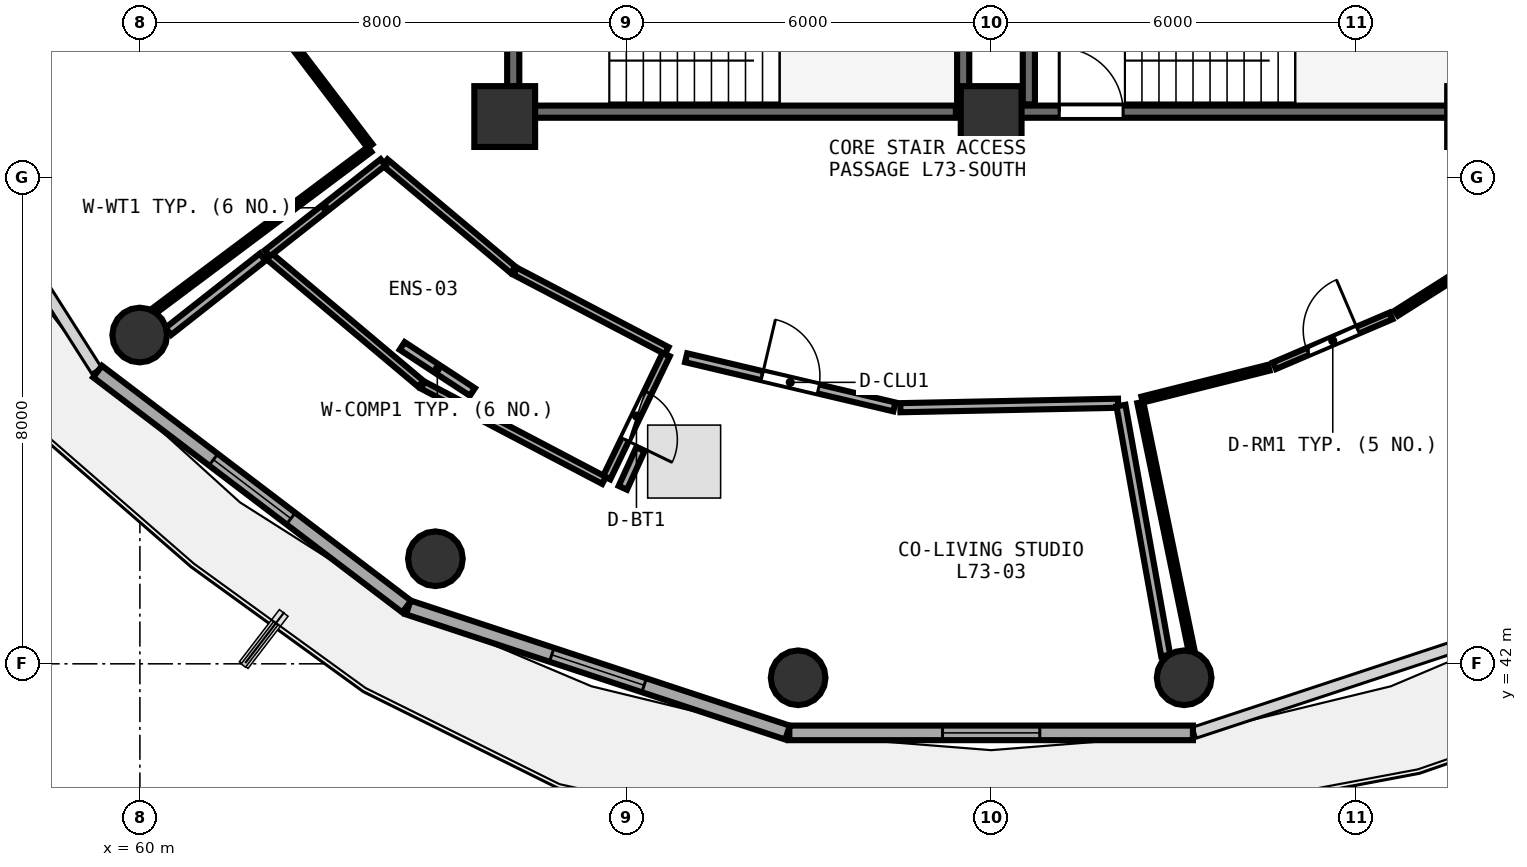
"""IFC4 building model, lengths in metres.
Left out: names, types, materials, properties, quantities, classifications, styles, units other than length and angle.
Written with IfcOpenShell. Run it as: python <this file> out.ifc"""

import sys

from ifc_helpers import new_model, si_unit, direction, frame, frame_2d, origin, origin_2d, place, context, subcontext, project, spatial, rectangle, circle, extrude, element, fill, save


model = new_model("IFC4")
c1 = context("Model", 3, precision=1e-05, world=origin(), true_north=direction((0.0, 1.0)))
c2 = subcontext(c1, "Body", "Model", "MODEL_VIEW")
j1 = project(units=[si_unit("LENGTHUNIT", "METRE"), si_unit("PLANEANGLEUNIT", "RADIAN")], contexts=[c1])
p1 = place(None, origin())
s1 = spatial("IfcSite", under=j1, at=p1, CompositionType="ELEMENT")
p2 = place(p1, origin())
s2 = spatial("IfcBuilding", under=s1, at=p2, CompositionType="ELEMENT")
p3 = place(p2, frame((0.0, 0.0, 286.2)))
s3 = spatial("IfcBuildingStorey", under=s2, at=p3, CompositionType="ELEMENT", Elevation=286.2)
for number, where, z_axis, x_axis in (
    (1, (66.0, 51.0, 0.0), (0.0, 0.0, 1.0), (1.0, 0.0, 0.0)),
    (2, (74.0, 51.0, 0.0), (0.0, 0.0, 1.0), (1.0, 0.0, 0.0)),
):
    element("IfcColumn", number, at=place(p3, frame(where, z_axis=z_axis, x_axis=x_axis)), inside=s3, PredefinedType="PILASTER", context=c2, shape_type="SweptSolid", body=[
        extrude(rectangle(XDim=1.0, YDim=1.0, at=origin_2d()), origin(), (0.0, 0.0, 1.0), 3.75),
    ])
for number, where, z_axis, x_axis in (
    (3, (59.997, 47.407, 0.0), (0.0, 0.0, 1.0), (1.0, 0.0, 0.0)),
    (4, (64.86, 43.728, 0.0), (0.0, 0.0, 1.0), (1.0, 0.0, 0.0)),
    (5, (70.826, 41.771, 0.0), (0.0, 0.0, 1.0), (1.0, 0.0, 0.0)),
    (6, (77.174, 41.771, 0.0), (0.0, 0.0, 1.0), (1.0, 0.0, 0.0)),
):
    element("IfcColumn", number, at=place(p3, frame(where, z_axis=z_axis, x_axis=x_axis)), inside=s3, PredefinedType="COLUMN", context=c2, shape_type="SweptSolid", body=[
        extrude(circle(Radius=0.45, at=origin_2d()), origin(), (0.0, 0.0, 1.0), 3.75),
    ])
p4 = place(p3, frame((59.304, 46.806, 0.0), z_axis=(0.0, 0.0, 1.0), x_axis=(0.796010444211, -0.605282886514, 0.0)))
e7 = element("IfcWall", 7, at=p4, inside=s3, PredefinedType="SOLIDWALL", context=c2, shape_type="SweptSolid", body=[
    extrude(rectangle(XDim=6.387, YDim=0.24, at=frame_2d((3.194, 0.0))), origin(), (0.0, 0.0, 1.0), 3.475),
])
p5 = place(p4, frame((2.394, 0.0, 0.85)))
e8 = element("IfcOpeningElement", 8, at=p5, cuts=e7, PredefinedType="OPENING", context=c2, shape_type="SweptSolid", body=[
    extrude(rectangle(XDim=1.6, YDim=1.45, at=frame_2d((0.8, 0.725))), frame((0.0, 0.13, 0.0), z_axis=(0.0, -1.0, 0.0), x_axis=(1.0, 0.0, 0.0)), (0.0, 0.0, 1.0), 0.26),
])
p6 = place(p3, frame((64.414, 42.927, 0.0), z_axis=(0.0, 0.0, 1.0), x_axis=(0.949663708393, -0.313271193954, 0.0)))
e9 = element("IfcWall", 9, at=p6, inside=s3, PredefinedType="SOLIDWALL", context=c2, shape_type="SweptSolid", body=[
    extrude(rectangle(XDim=6.568, YDim=0.24, at=frame_2d((3.284, 0.0))), origin(), (0.0, 0.0, 1.0), 3.475),
])
p7 = place(p6, frame((2.484, 0.0, 0.85)))
e10 = element("IfcOpeningElement", 10, at=p7, cuts=e9, PredefinedType="OPENING", context=c2, shape_type="SweptSolid", body=[
    extrude(rectangle(XDim=1.6, YDim=1.45, at=frame_2d((0.8, 0.725))), frame((0.0, 0.13, 0.0), z_axis=(0.0, -1.0, 0.0), x_axis=(1.0, 0.0, 0.0)), (0.0, 0.0, 1.0), 0.26),
])
p8 = place(p3, frame((70.681, 40.864, 0.0), z_axis=(0.0, 0.0, 1.0), x_axis=(1.0, 0.0, 0.0)))
e11 = element("IfcWall", 11, at=p8, inside=s3, PredefinedType="SOLIDWALL", context=c2, shape_type="SweptSolid", body=[
    extrude(rectangle(XDim=6.638, YDim=0.24, at=frame_2d((3.319, 0.0))), origin(), (0.0, 0.0, 1.0), 3.475),
])
p9 = place(p8, frame((2.519, 0.0, 0.85)))
e12 = element("IfcOpeningElement", 12, at=p9, cuts=e11, PredefinedType="OPENING", context=c2, shape_type="SweptSolid", body=[
    extrude(rectangle(XDim=1.6, YDim=1.45, at=frame_2d((0.8, 0.725))), frame((0.0, 0.13, 0.0), z_axis=(0.0, -1.0, 0.0), x_axis=(1.0, 0.0, 0.0)), (0.0, 0.0, 1.0), 0.26),
])
p10 = place(p3, frame((74.0, 51.08, 0.0), z_axis=(0.0, 0.0, 1.0), x_axis=(1.0, 0.0, 0.0)))
e13 = element("IfcWall", 13, at=p10, inside=s3, PredefinedType="SHEAR", context=c2, shape_type="SweptSolid", body=[
    extrude(rectangle(XDim=7.9, YDim=0.2, at=frame_2d((3.95, 0.0))), origin(), (0.0, 0.0, 1.0), 3.49),
])
p11 = place(p10, frame((1.12, 0.0, 0.0)))
e14 = element("IfcOpeningElement", 14, at=p11, cuts=e13, PredefinedType="OPENING", context=c2, shape_type="SweptSolid", body=[
    extrude(rectangle(XDim=1.05, YDim=2.1, at=frame_2d((0.525, 1.05))), frame((0.0, 0.11, 0.0), z_axis=(0.0, -1.0, 0.0), x_axis=(1.0, 0.0, 0.0)), (0.0, 0.0, 1.0), 0.22),
])
p12 = place(p3, frame((74.62, 54.27, 0.0), z_axis=(0.0, 0.0, 1.0), x_axis=(0.0, -1.0, 0.0)))
e15 = element("IfcWall", 15, at=p12, inside=s3, PredefinedType="SHEAR", context=c2, shape_type="SweptSolid", body=[
    extrude(rectangle(XDim=3.07, YDim=0.2, at=frame_2d((1.535, 0.0))), origin(), (0.0, 0.0, 1.0), 3.49),
])
p13 = place(p3, frame((66.26, 51.08, 0.0), z_axis=(0.0, 0.0, 1.0), x_axis=(1.0, 0.0, 0.0)))
e16 = element("IfcWall", 16, at=p13, inside=s3, PredefinedType="SHEAR", context=c2, shape_type="SweptSolid", body=[
    extrude(rectangle(XDim=7.16, YDim=0.2, at=frame_2d((3.58, 0.0))), origin(), (0.0, 0.0, 1.0), 3.49),
])
p14 = place(p3, frame((73.54, 51.2, 0.0), z_axis=(0.0, 0.0, 1.0), x_axis=(0.0, 1.0, 0.0)))
e17 = element("IfcWall", 17, at=p14, inside=s3, PredefinedType="SHEAR", context=c2, shape_type="SweptSolid", body=[
    extrude(rectangle(XDim=3.07, YDim=0.2, at=frame_2d((1.535, 0.0))), origin(), (0.0, 0.0, 1.0), 3.49),
])
p15 = place(p3, frame((66.14, 54.27, 0.0), z_axis=(0.0, 0.0, 1.0), x_axis=(0.0, -1.0, 0.0)))
e18 = element("IfcWall", 18, at=p15, inside=s3, PredefinedType="SHEAR", context=c2, shape_type="SweptSolid", body=[
    extrude(rectangle(XDim=3.07, YDim=0.2, at=frame_2d((1.535, 0.0))), origin(), (0.0, 0.0, 1.0), 3.49),
])
p16 = place(p15, frame((1.01, 0.0, 0.0)))
e19 = element("IfcOpeningElement", 19, at=p16, cuts=e18, PredefinedType="OPENING", context=c2, shape_type="SweptSolid", body=[
    extrude(rectangle(XDim=1.05, YDim=2.1, at=frame_2d((0.525, 1.05))), frame((0.0, 0.11, 0.0), z_axis=(0.0, -1.0, 0.0), x_axis=(1.0, 0.0, 0.0)), (0.0, 0.0, 1.0), 0.22),
])
p17 = place(p3, frame((68.656, 47.087, 0.0), z_axis=(0.0, 0.0, 1.0), x_axis=(-0.435107089182, -0.900378709735, 0.0)))
e20 = element("IfcWall", 20, at=p17, inside=s3, PredefinedType="PLUMBINGWALL", context=c2, shape_type="SweptSolid", body=[
    extrude(rectangle(XDim=2.25, YDim=0.13, at=frame_2d((1.125, 0.0))), origin(), (0.0, 0.0, 1.0), 3.175),
])
p18 = place(p17, frame((0.695, 0.0, 0.0)))
e21 = element("IfcOpeningElement", 21, at=p18, cuts=e20, PredefinedType="OPENING", context=c2, shape_type="SweptSolid", body=[
    extrude(rectangle(XDim=0.86, YDim=2.05, at=frame_2d((0.43, 1.025))), frame((0.0, 0.075, 0.0), z_axis=(0.0, -1.0, 0.0), x_axis=(1.0, 0.0, 0.0)), (0.0, 0.0, 1.0), 0.15),
])
p19 = place(p3, frame((68.983, 47.033, 0.0), z_axis=(0.0, 0.0, 1.0), x_axis=(0.973265021884, -0.229684995542, 0.0)))
e22 = element("IfcWall", 22, at=p19, inside=s3, PredefinedType="PARTITIONING", context=c2, shape_type="SweptSolid", body=[
    extrude(rectangle(XDim=3.519, YDim=0.15, at=frame_2d((1.76, 0.0))), origin(), (0.0, 0.0, 1.0), 3.075),
])
p20 = place(p19, frame((1.285, 0.0, 0.0)))
e23 = element("IfcOpeningElement", 23, at=p20, cuts=e22, PredefinedType="OPENING", context=c2, shape_type="SweptSolid", body=[
    extrude(rectangle(XDim=0.95, YDim=2.08, at=frame_2d((0.475, 1.04))), frame((0.0, 0.085, 0.0), z_axis=(0.0, -1.0, 0.0), x_axis=(1.0, 0.0, 0.0)), (0.0, 0.0, 1.0), 0.17),
])
p21 = place(p3, frame((78.66, 46.903, 0.0), z_axis=(0.0, 0.0, 1.0), x_axis=(0.919508345424, 0.39307048057, 0.0)))
e24 = element("IfcWall", 24, at=p21, inside=s3, PredefinedType="PARTITIONING", context=c2, shape_type="SweptSolid", body=[
    extrude(rectangle(XDim=2.083, YDim=0.12, at=frame_2d((1.042, 0.0))), origin(), (0.0, 0.0, 1.0), 3.48),
])
p22 = place(p21, frame((0.592, 0.0, 0.0)))
e25 = element("IfcOpeningElement", 25, at=p22, cuts=e24, PredefinedType="OPENING", context=c2, shape_type="SweptSolid", body=[
    extrude(rectangle(XDim=0.9, YDim=2.08, at=frame_2d((0.45, 1.04))), frame((0.0, 0.07, 0.0), z_axis=(0.0, -1.0, 0.0), x_axis=(1.0, 0.0, 0.0)), (0.0, 0.0, 1.0), 0.14),
])
p23 = place(p3, frame((62.565, 52.117, 0.0), z_axis=(0.0, 0.0, 1.0), x_axis=(0.605473441765, -0.795865510823, 0.0)))
e26 = element("IfcWall", 26, at=p23, inside=s3, PredefinedType="PARTITIONING", context=c2, shape_type="SweptSolid", body=[
    extrude(rectangle(XDim=2.014, YDim=0.1, at=frame_2d((1.007, 0.0))), origin(), (0.0, 0.0, 1.0), 3.075),
])
p24 = place(p3, frame((63.777, 50.458, 0.0), z_axis=(0.0, 0.0, 1.0), x_axis=(-0.800384816546, -0.599486568191, 0.0)))
e27 = element("IfcWall", 27, at=p24, inside=s3, PredefinedType="PARTITIONING", context=c2, shape_type="SweptSolid", body=[
    extrude(rectangle(XDim=4.414, YDim=0.1, at=frame_2d((2.207, 0.0))), origin(), (0.0, 0.0, 1.0), 3.175),
])
p25 = place(p3, frame((64.03, 50.247, 0.0), z_axis=(0.0, 0.0, 1.0), x_axis=(0.766167599315, -0.642640809286, 0.0)))
e28 = element("IfcWall", 28, at=p25, inside=s3, PredefinedType="PLUMBINGWALL", context=c2, shape_type="SweptSolid", body=[
    extrude(rectangle(XDim=2.753, YDim=0.13, at=frame_2d((1.376, 0.0))), origin(), (0.0, 0.0, 1.0), 3.075),
])
p26 = place(p3, frame((66.173, 48.456, 0.0), z_axis=(0.0, 0.0, 1.0), x_axis=(0.885795858503, -0.464075098512, 0.0)))
e29 = element("IfcWall", 29, at=p26, inside=s3, PredefinedType="PLUMBINGWALL", context=c2, shape_type="SweptSolid", body=[
    extrude(rectangle(XDim=2.813, YDim=0.13, at=frame_2d((1.406, 0.0))), origin(), (0.0, 0.0, 1.0), 3.235),
])
p27 = place(p3, frame((67.633, 45.016, 0.0), z_axis=(0.0, 0.0, 1.0), x_axis=(-0.885210583291, 0.465190523581, 0.0)))
e30 = element("IfcWall", 30, at=p27, inside=s3, PredefinedType="PLUMBINGWALL", context=c2, shape_type="SweptSolid", body=[
    extrude(rectangle(XDim=3.367, YDim=0.13, at=frame_2d((1.684, 0.0))), origin(), (0.0, 0.0, 1.0), 3.075),
])
p28 = place(p3, frame((64.62, 46.605, 0.0), z_axis=(0.0, 0.0, 1.0), x_axis=(-0.765494729633, 0.643442164382, 0.0)))
e31 = element("IfcWall", 31, at=p28, inside=s3, PredefinedType="PLUMBINGWALL", context=c2, shape_type="SweptSolid", body=[
    extrude(rectangle(XDim=3.296, YDim=0.13, at=frame_2d((1.648, 0.0))), origin(), (0.0, 0.0, 1.0), 3.075),
])
p29 = place(p3, frame((62.097, 48.751, 0.0), z_axis=(0.0, 0.0, 1.0), x_axis=(0.786076764473, 0.618128886525, 0.0)))
e32 = element("IfcWall", 32, at=p29, inside=s3, PredefinedType="PLUMBINGWALL", context=c2, shape_type="SweptSolid", body=[
    extrude(rectangle(XDim=2.42, YDim=0.13, at=frame_2d((1.21, 0.0))), origin(), (0.0, 0.0, 1.0), 3.075),
])
p30 = place(p3, frame((72.507, 46.212, 0.0), z_axis=(0.0, 0.0, 1.0), x_axis=(0.999790880908, 0.02044980325, 0.0)))
e33 = element("IfcWall", 33, at=p30, inside=s3, PredefinedType="PARTITIONING", context=c2, shape_type="SweptSolid", body=[
    extrude(rectangle(XDim=3.582, YDim=0.15, at=frame_2d((1.791, 0.0))), origin(), (0.0, 0.0, 1.0), 3.075),
])
p31 = place(p3, frame((76.135, 46.247, 0.0), z_axis=(0.0, 0.0, 1.0), x_axis=(0.176199339585, -0.984354505618, 0.0)))
e34 = element("IfcWall", 34, at=p31, inside=s3, PredefinedType="PARTITIONING", context=c2, shape_type="SweptSolid", body=[
    extrude(rectangle(XDim=4.176, YDim=0.15, at=frame_2d((2.088, 0.0))), origin(), (0.0, 0.0, 1.0), 3.075),
])
p32 = place(p3, frame((60.468, 47.468, 0.0), z_axis=(0.0, 0.0, 1.0), x_axis=(0.785768578647, 0.618520606618, 0.0)))
e35 = element("IfcWall", 35, at=p32, inside=s3, PredefinedType="PARTITIONING", context=c2, shape_type="SweptSolid", body=[
    extrude(rectangle(XDim=1.974, YDim=0.15, at=frame_2d((0.987, 0.0))), origin(), (0.0, 0.0, 1.0), 3.075),
])
p33 = place(p3, frame((64.314, 47.228, 0.0), z_axis=(0.0, 0.0, 1.0), x_axis=(0.836108744157, -0.54856373189, 0.0)))
e36 = element("IfcWall", 36, at=p33, inside=s3, PredefinedType="PARTITIONING", context=c2, shape_type="SweptSolid", body=[
    extrude(rectangle(XDim=1.381, YDim=0.15, at=frame_2d((0.69, 0.0))), origin(), (0.0, 0.0, 1.0), 3.075),
])
p34 = place(p3, frame((67.943, 44.894, 0.0), z_axis=(0.0, 0.0, 1.0), x_axis=(0.415116627058, 0.909768204511, 0.0)))
e37 = element("IfcWall", 37, at=p34, inside=s3, PredefinedType="PARTITIONING", context=c2, shape_type="SweptSolid", body=[
    extrude(rectangle(XDim=0.7, YDim=0.15, at=frame_2d((0.35, 0.0))), origin(), (0.0, 0.0, 1.0), 3.48),
])
p35 = place(p3, frame((76.484, 46.346, 0.0), z_axis=(0.0, 0.0, 1.0), x_axis=(0.969827312174, 0.243792913272, 0.0)))
e38 = element("IfcWall", 38, at=p35, inside=s3, PredefinedType="PARTITIONING", context=c2, shape_type="SweptSolid", body=[
    extrude(rectangle(XDim=2.147, YDim=0.1, at=frame_2d((1.073, 0.0))), origin(), (0.0, 0.0, 1.0), 3.48),
])
p36 = place(p3, frame((80.665, 47.766, 0.0), z_axis=(0.0, 0.0, 1.0), x_axis=(0.844856002064, 0.534993771717, 0.0)))
e39 = element("IfcWall", 39, at=p36, inside=s3, PredefinedType="PARTITIONING", context=c2, shape_type="SweptSolid", body=[
    extrude(rectangle(XDim=2.092, YDim=0.1, at=frame_2d((1.046, 0.0))), origin(), (0.0, 0.0, 1.0), 3.075),
])
p37 = place(p3, frame((77.293, 42.23, 0.0), z_axis=(0.0, 0.0, 1.0), x_axis=(-0.202308141573, 0.979321916355, 0.0)))
e40 = element("IfcWall", 40, at=p37, inside=s3, PredefinedType="PARTITIONING", context=c2, shape_type="SweptSolid", body=[
    extrude(rectangle(XDim=4.153, YDim=0.1, at=frame_2d((2.076, 0.0))), origin(), (0.0, 0.0, 1.0), 3.175),
])
p38 = place(p5, origin())
e41 = element("IfcWindow", 41, at=p38, inside=s3, PartitioningType="SINGLE_PANEL", PredefinedType="WINDOW", context=c2, shape_type="SweptSolid", body=[
    extrude(rectangle(XDim=1.6, YDim=1.45, at=frame_2d((0.8, 0.725))), frame((0.0, 0.03, 0.0), z_axis=(0.0, -1.0, 0.0), x_axis=(1.0, 0.0, 0.0)), (0.0, 0.0, 1.0), 0.06),
])
fill(e8, e41)
p39 = place(p7, origin())
e42 = element("IfcWindow", 42, at=p39, inside=s3, PartitioningType="SINGLE_PANEL", PredefinedType="WINDOW", context=c2, shape_type="SweptSolid", body=[
    extrude(rectangle(XDim=1.6, YDim=1.45, at=frame_2d((0.8, 0.725))), frame((0.0, 0.03, 0.0), z_axis=(0.0, -1.0, 0.0), x_axis=(1.0, 0.0, 0.0)), (0.0, 0.0, 1.0), 0.06),
])
fill(e10, e42)
p40 = place(p9, origin())
e43 = element("IfcWindow", 43, at=p40, inside=s3, PartitioningType="SINGLE_PANEL", PredefinedType="WINDOW", context=c2, shape_type="SweptSolid", body=[
    extrude(rectangle(XDim=1.6, YDim=1.45, at=frame_2d((0.8, 0.725))), frame((0.0, 0.03, 0.0), z_axis=(0.0, -1.0, 0.0), x_axis=(1.0, 0.0, 0.0)), (0.0, 0.0, 1.0), 0.06),
])
fill(e12, e43)
p41 = place(p11, origin())
e44 = element("IfcDoor", 44, at=p41, inside=s3, OperationType="SINGLE_SWING_LEFT", PredefinedType="DOOR", context=c2, shape_type="SweptSolid", body=[
    extrude(rectangle(XDim=1.05, YDim=2.1, at=frame_2d((0.525, 1.05))), frame((0.0, 0.025, 0.0), z_axis=(0.0, -1.0, 0.0), x_axis=(1.0, 0.0, 0.0)), (0.0, 0.0, 1.0), 0.05),
])
fill(e14, e44)
p42 = place(p18, origin())
e45 = element("IfcDoor", 45, at=p42, inside=s3, OperationType="SINGLE_SWING_RIGHT", PredefinedType="DOOR", context=c2, shape_type="SweptSolid", body=[
    extrude(rectangle(XDim=0.86, YDim=2.05, at=frame_2d((0.43, 1.025))), frame((0.0, 0.025, 0.0), z_axis=(0.0, -1.0, 0.0), x_axis=(1.0, 0.0, 0.0)), (0.0, 0.0, 1.0), 0.05),
])
fill(e21, e45)
p43 = place(p20, origin())
e46 = element("IfcDoor", 46, at=p43, inside=s3, OperationType="SINGLE_SWING_LEFT", PredefinedType="DOOR", context=c2, shape_type="SweptSolid", body=[
    extrude(rectangle(XDim=0.95, YDim=2.08, at=frame_2d((0.475, 1.04))), frame((0.0, 0.025, 0.0), z_axis=(0.0, -1.0, 0.0), x_axis=(1.0, 0.0, 0.0)), (0.0, 0.0, 1.0), 0.05),
])
fill(e23, e46)
p44 = place(p22, origin())
e47 = element("IfcDoor", 47, at=p44, inside=s3, OperationType="SINGLE_SWING_RIGHT", PredefinedType="DOOR", context=c2, shape_type="SweptSolid", body=[
    extrude(rectangle(XDim=0.9, YDim=2.08, at=frame_2d((0.45, 1.04))), frame((0.0, 0.025, 0.0), z_axis=(0.0, -1.0, 0.0), x_axis=(1.0, 0.0, 0.0)), (0.0, 0.0, 1.0), 0.05),
])
fill(e25, e47)
save(model, sys.argv[1])
